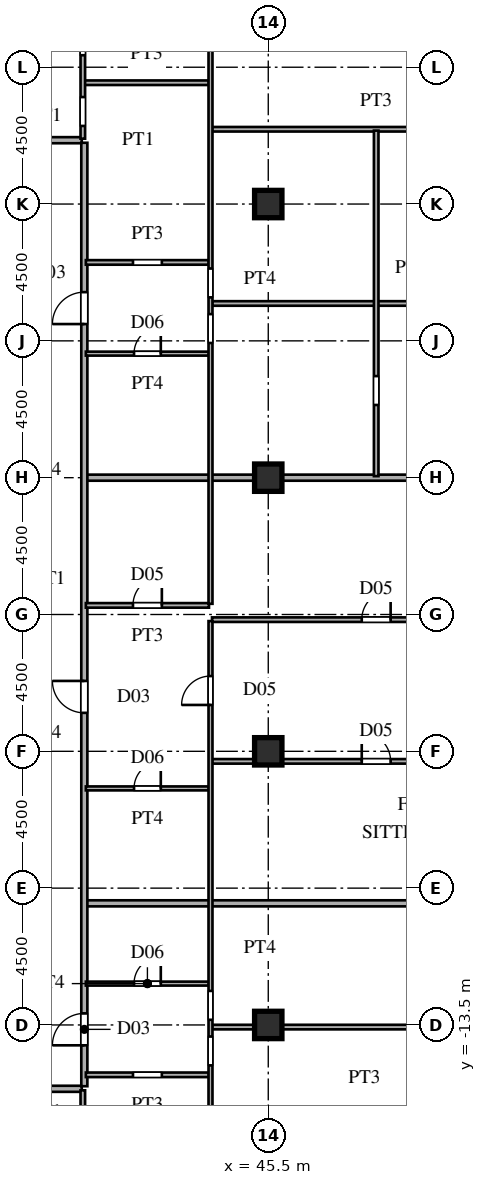
"""IFC4 building model, lengths in metres.
Left out: names, types, materials, properties, quantities, classifications, styles, units other than length and angle.
Written with IfcOpenShell. Run it as: python <this file> out.ifc"""

import sys

from ifc_helpers import new_model, si_unit, direction, frame, frame_2d, origin, origin_2d, place, context, subcontext, project, spatial, rectangle, i_section, extrude, source, transform, mapped, element, fill, save


model = new_model("IFC4")
c1 = context("Model", 3, precision=1e-05, world=origin(), true_north=direction((0.0, 1.0)))
c2 = subcontext(c1, "Body", "Model", "MODEL_VIEW")
j1 = project(units=[si_unit("LENGTHUNIT", "METRE"), si_unit("PLANEANGLEUNIT", "RADIAN")], contexts=[c1])
p1 = place(None, origin())
s1 = spatial("IfcSite", under=j1, at=p1, CompositionType="ELEMENT")
p2 = place(p1, origin())
s2 = spatial("IfcBuilding", under=s1, at=p2, CompositionType="ELEMENT")
p3 = place(p2, frame((0.0, 0.0, 18.9)))
s3 = spatial("IfcBuildingStorey", under=s2, at=p3, CompositionType="ELEMENT", Elevation=18.9)
m1 = source(origin(), c2, "Body", "SweptSolid", [
    extrude(i_section(OverallWidth=0.9, OverallDepth=0.9, WebThickness=0.036, FlangeThickness=0.055, at=origin_2d()), origin(), (0.0, 0.0, 1.0), 3.6),
])
for number, where, z_axis, x_axis in (
    (1, (45.5, -13.5, 0.0), (0.0, 0.0, 1.0), (1.0, 0.0, 0.0)),
    (2, (45.5, -4.5, 0.0), (0.0, 0.0, 1.0), (1.0, 0.0, 0.0)),
    (3, (45.5, 4.5, 0.0), (0.0, 0.0, 1.0), (1.0, 0.0, 0.0)),
    (4, (45.5, 13.5, 0.0), (0.0, 0.0, 1.0), (1.0, 0.0, 0.0)),
):
    element("IfcColumn", number, at=place(p3, frame(where, z_axis=z_axis, x_axis=x_axis)), inside=s3, PredefinedType="COLUMN", context=c2, shape_type="MappedRepresentation", body=[
        mapped(m1, transform((0.0, 0.0, 0.0), scale=1.0)),
    ])
p4 = place(p3, frame((36.585, -15.6, 0.0), z_axis=(0.0, 0.0, 1.0), x_axis=(1.0, 0.0, 0.0)))
e5 = element("IfcWall", 5, at=p4, inside=s3, PredefinedType="PARTITIONING", context=c2, shape_type="SweptSolid", body=[
    extrude(rectangle(XDim=2.78, YDim=0.2, at=frame_2d((1.39, 0.0))), origin(), (0.0, 0.0, 1.0), 3.38),
])
p5 = place(p3, frame((39.5, -15.14, 0.0), z_axis=(0.0, 0.0, 1.0), x_axis=(1.0, 0.0, 0.0)))
e6 = element("IfcWall", 6, at=p5, inside=s3, PredefinedType="PARTITIONING", context=c2, shape_type="SweptSolid", body=[
    extrude(rectangle(XDim=4.05, YDim=0.15, at=frame_2d((2.025, 0.0))), origin(), (0.0, 0.0, 1.0), 3.38),
])
p6 = place(p5, frame((1.55, 0.0, 0.0)))
e7 = element("IfcOpeningElement", 7, at=p6, cuts=e6, PredefinedType="OPENING", context=c2, shape_type="SweptSolid", body=[
    extrude(rectangle(XDim=0.95, YDim=2.15, at=frame_2d((0.475, 1.075))), frame((0.0, 0.085, 0.0), z_axis=(0.0, -1.0, 0.0), x_axis=(1.0, 0.0, 0.0)), (0.0, 0.0, 1.0), 0.17),
])
p7 = place(p3, frame((43.65, -13.57, 0.0), z_axis=(0.0, 0.0, 1.0), x_axis=(1.0, 0.0, 0.0)))
e8 = element("IfcWall", 8, at=p7, inside=s3, PredefinedType="PARTITIONING", context=c2, shape_type="SweptSolid", body=[
    extrude(rectangle(XDim=20.075, YDim=0.15, at=frame_2d((10.038, 0.0))), origin(), (0.0, 0.0, 1.0), 2.68),
])
p8 = place(p3, frame((39.5, -12.14, 0.0), z_axis=(0.0, 0.0, 1.0), x_axis=(1.0, 0.0, 0.0)))
e9 = element("IfcWall", 9, at=p8, inside=s3, PredefinedType="PARTITIONING", context=c2, shape_type="SweptSolid", body=[
    extrude(rectangle(XDim=4.05, YDim=0.13, at=frame_2d((2.025, 0.0))), origin(), (0.0, 0.0, 1.0), 3.38),
])
p9 = place(p8, frame((1.585, 0.0, 0.0)))
e10 = element("IfcOpeningElement", 10, at=p9, cuts=e9, PredefinedType="OPENING", context=c2, shape_type="SweptSolid", body=[
    extrude(rectangle(XDim=0.88, YDim=2.1, at=frame_2d((0.44, 1.05))), frame((0.0, 0.075, 0.0), z_axis=(0.0, -1.0, 0.0), x_axis=(1.0, 0.0, 0.0)), (0.0, 0.0, 1.0), 0.15),
])
p10 = place(p3, frame((39.53, -9.5, 0.0), z_axis=(0.0, 0.0, 1.0), x_axis=(1.0, 0.0, 0.0)))
e11 = element("IfcWall", 11, at=p10, inside=s3, PredefinedType="PARTITIONING", context=c2, shape_type="SweptSolid", body=[
    extrude(rectangle(XDim=32.845, YDim=0.2, at=frame_2d((16.422, 0.0))), origin(), (0.0, 0.0, 1.0), 3.38),
])
p11 = place(p3, frame((39.5, -5.72, 0.0), z_axis=(0.0, 0.0, 1.0), x_axis=(1.0, 0.0, 0.0)))
e12 = element("IfcWall", 12, at=p11, inside=s3, PredefinedType="PARTITIONING", context=c2, shape_type="SweptSolid", body=[
    extrude(rectangle(XDim=4.05, YDim=0.13, at=frame_2d((2.025, 0.0))), origin(), (0.0, 0.0, 1.0), 3.38),
])
p12 = place(p11, frame((1.585, 0.0, 0.0)))
e13 = element("IfcOpeningElement", 13, at=p12, cuts=e12, PredefinedType="OPENING", context=c2, shape_type="SweptSolid", body=[
    extrude(rectangle(XDim=0.88, YDim=2.1, at=frame_2d((0.44, 1.05))), frame((0.0, 0.075, 0.0), z_axis=(0.0, -1.0, 0.0), x_axis=(1.0, 0.0, 0.0)), (0.0, 0.0, 1.0), 0.15),
])
p13 = place(p3, frame((43.65, -4.83, 0.0), z_axis=(0.0, 0.0, 1.0), x_axis=(1.0, 0.0, 0.0)))
e14 = element("IfcWall", 14, at=p13, inside=s3, PredefinedType="PARTITIONING", context=c2, shape_type="SweptSolid", body=[
    extrude(rectangle(XDim=28.885, YDim=0.15, at=frame_2d((14.442, 0.0))), origin(), (0.0, 0.0, 1.0), 3.38),
])
p14 = place(p13, frame((4.925, 0.0, 0.0)))
e15 = element("IfcOpeningElement", 15, at=p14, cuts=e14, PredefinedType="OPENING", context=c2, shape_type="SweptSolid", body=[
    extrude(rectangle(XDim=0.95, YDim=2.15, at=frame_2d((0.475, 1.075))), frame((0.0, 0.085, 0.0), z_axis=(0.0, -1.0, 0.0), x_axis=(1.0, 0.0, 0.0)), (0.0, 0.0, 1.0), 0.17),
])
p15 = place(p13, frame((13.225, 0.0, 0.0)))
e16 = element("IfcOpeningElement", 16, at=p15, cuts=e14, PredefinedType="OPENING", context=c2, shape_type="SweptSolid", body=[
    extrude(rectangle(XDim=0.95, YDim=2.15, at=frame_2d((0.475, 1.075))), frame((0.0, 0.085, 0.0), z_axis=(0.0, -1.0, 0.0), x_axis=(1.0, 0.0, 0.0)), (0.0, 0.0, 1.0), 0.17),
])
p16 = place(p3, frame((43.65, -0.17, 0.0), z_axis=(0.0, 0.0, 1.0), x_axis=(1.0, 0.0, 0.0)))
e17 = element("IfcWall", 17, at=p16, inside=s3, PredefinedType="PARTITIONING", context=c2, shape_type="SweptSolid", body=[
    extrude(rectangle(XDim=28.885, YDim=0.15, at=frame_2d((14.442, 0.0))), origin(), (0.0, 0.0, 1.0), 3.38),
])
p17 = place(p16, frame((4.925, 0.0, 0.0)))
e18 = element("IfcOpeningElement", 18, at=p17, cuts=e17, PredefinedType="OPENING", context=c2, shape_type="SweptSolid", body=[
    extrude(rectangle(XDim=0.95, YDim=2.15, at=frame_2d((0.475, 1.075))), frame((0.0, 0.085, 0.0), z_axis=(0.0, -1.0, 0.0), x_axis=(1.0, 0.0, 0.0)), (0.0, 0.0, 1.0), 0.17),
])
p18 = place(p16, frame((13.225, 0.0, 0.0)))
e19 = element("IfcOpeningElement", 19, at=p18, cuts=e17, PredefinedType="OPENING", context=c2, shape_type="SweptSolid", body=[
    extrude(rectangle(XDim=0.95, YDim=2.15, at=frame_2d((0.475, 1.075))), frame((0.0, 0.085, 0.0), z_axis=(0.0, -1.0, 0.0), x_axis=(1.0, 0.0, 0.0)), (0.0, 0.0, 1.0), 0.17),
])
p19 = place(p3, frame((39.5, 0.3, 0.0), z_axis=(0.0, 0.0, 1.0), x_axis=(1.0, 0.0, 0.0)))
e20 = element("IfcWall", 20, at=p19, inside=s3, PredefinedType="PARTITIONING", context=c2, shape_type="SweptSolid", body=[
    extrude(rectangle(XDim=4.05, YDim=0.15, at=frame_2d((2.025, 0.0))), origin(), (0.0, 0.0, 1.0), 3.38),
])
p20 = place(p19, frame((1.55, 0.0, 0.0)))
e21 = element("IfcOpeningElement", 21, at=p20, cuts=e20, PredefinedType="OPENING", context=c2, shape_type="SweptSolid", body=[
    extrude(rectangle(XDim=0.95, YDim=2.15, at=frame_2d((0.475, 1.075))), frame((0.0, 0.085, 0.0), z_axis=(0.0, -1.0, 0.0), x_axis=(1.0, 0.0, 0.0)), (0.0, 0.0, 1.0), 0.17),
])
p21 = place(p3, frame((39.53, 4.5, 0.0), z_axis=(0.0, 0.0, 1.0), x_axis=(1.0, 0.0, 0.0)))
e22 = element("IfcWall", 22, at=p21, inside=s3, PredefinedType="PARTITIONING", context=c2, shape_type="SweptSolid", body=[
    extrude(rectangle(XDim=14.99, YDim=0.2, at=frame_2d((7.495, 0.0))), origin(), (0.0, 0.0, 1.0), 2.68),
])
p22 = place(p3, frame((39.5, 8.58, 0.0), z_axis=(0.0, 0.0, 1.0), x_axis=(1.0, 0.0, 0.0)))
e23 = element("IfcWall", 23, at=p22, inside=s3, PredefinedType="PARTITIONING", context=c2, shape_type="SweptSolid", body=[
    extrude(rectangle(XDim=4.05, YDim=0.13, at=frame_2d((2.025, 0.0))), origin(), (0.0, 0.0, 1.0), 3.38),
])
p23 = place(p22, frame((1.585, 0.0, 0.0)))
e24 = element("IfcOpeningElement", 24, at=p23, cuts=e23, PredefinedType="OPENING", context=c2, shape_type="SweptSolid", body=[
    extrude(rectangle(XDim=0.88, YDim=2.1, at=frame_2d((0.44, 1.05))), frame((0.0, 0.075, 0.0), z_axis=(0.0, -1.0, 0.0), x_axis=(1.0, 0.0, 0.0)), (0.0, 0.0, 1.0), 0.15),
])
p24 = place(p3, frame((43.65, 10.23, 0.0), z_axis=(0.0, 0.0, 1.0), x_axis=(1.0, 0.0, 0.0)))
e25 = element("IfcWall", 25, at=p24, inside=s3, PredefinedType="PARTITIONING", context=c2, shape_type="SweptSolid", body=[
    extrude(rectangle(XDim=27.949, YDim=0.15, at=frame_2d((13.974, 0.0))), origin(), (0.0, 0.0, 1.0), 3.38),
])
p25 = place(p24, frame((21.938, 0.0, 0.0)))
e26 = element("IfcOpeningElement", 26, at=p25, cuts=e25, PredefinedType="OPENING", context=c2, shape_type="SweptSolid", body=[
    extrude(rectangle(XDim=0.95, YDim=2.15, at=frame_2d((0.475, 1.075))), frame((0.0, 0.085, 0.0), z_axis=(0.0, -1.0, 0.0), x_axis=(1.0, 0.0, 0.0)), (0.0, 0.0, 1.0), 0.17),
])
p26 = place(p24, frame((13.225, 0.0, 0.0)))
e27 = element("IfcOpeningElement", 27, at=p26, cuts=e25, PredefinedType="OPENING", context=c2, shape_type="SweptSolid", body=[
    extrude(rectangle(XDim=0.95, YDim=2.15, at=frame_2d((0.475, 1.075))), frame((0.0, 0.085, 0.0), z_axis=(0.0, -1.0, 0.0), x_axis=(1.0, 0.0, 0.0)), (0.0, 0.0, 1.0), 0.17),
])
p27 = place(p24, frame((7.65, 0.0, 0.0)))
e28 = element("IfcOpeningElement", 28, at=p27, cuts=e25, PredefinedType="OPENING", context=c2, shape_type="SweptSolid", body=[
    extrude(rectangle(XDim=0.95, YDim=2.15, at=frame_2d((0.475, 1.075))), frame((0.0, 0.085, 0.0), z_axis=(0.0, -1.0, 0.0), x_axis=(1.0, 0.0, 0.0)), (0.0, 0.0, 1.0), 0.17),
])
p28 = place(p3, frame((39.5, 11.58, 0.0), z_axis=(0.0, 0.0, 1.0), x_axis=(1.0, 0.0, 0.0)))
e29 = element("IfcWall", 29, at=p28, inside=s3, PredefinedType="PARTITIONING", context=c2, shape_type="SweptSolid", body=[
    extrude(rectangle(XDim=4.05, YDim=0.15, at=frame_2d((2.025, 0.0))), origin(), (0.0, 0.0, 1.0), 3.38),
])
p29 = place(p28, frame((1.55, 0.0, 0.0)))
e30 = element("IfcOpeningElement", 30, at=p29, cuts=e29, PredefinedType="OPENING", context=c2, shape_type="SweptSolid", body=[
    extrude(rectangle(XDim=0.95, YDim=2.15, at=frame_2d((0.475, 1.075))), frame((0.0, 0.085, 0.0), z_axis=(0.0, -1.0, 0.0), x_axis=(1.0, 0.0, 0.0)), (0.0, 0.0, 1.0), 0.17),
])
p30 = place(p3, frame((36.585, 15.6, 0.0), z_axis=(0.0, 0.0, 1.0), x_axis=(1.0, 0.0, 0.0)))
e31 = element("IfcWall", 31, at=p30, inside=s3, PredefinedType="PARTITIONING", context=c2, shape_type="SweptSolid", body=[
    extrude(rectangle(XDim=2.78, YDim=0.2, at=frame_2d((1.39, 0.0))), origin(), (0.0, 0.0, 1.0), 3.38),
])
p31 = place(p3, frame((43.65, 15.96, 0.0), z_axis=(0.0, 0.0, 1.0), x_axis=(1.0, 0.0, 0.0)))
e32 = element("IfcWall", 32, at=p31, inside=s3, PredefinedType="PARTITIONING", context=c2, shape_type="SweptSolid", body=[
    extrude(rectangle(XDim=10.8, YDim=0.15, at=frame_2d((5.4, 0.0))), origin(), (0.0, 0.0, 1.0), 3.38),
])
p32 = place(p31, frame((7.65, 0.0, 0.0)))
e33 = element("IfcOpeningElement", 33, at=p32, cuts=e32, PredefinedType="OPENING", context=c2, shape_type="SweptSolid", body=[
    extrude(rectangle(XDim=0.95, YDim=2.15, at=frame_2d((0.475, 1.075))), frame((0.0, 0.085, 0.0), z_axis=(0.0, -1.0, 0.0), x_axis=(1.0, 0.0, 0.0)), (0.0, 0.0, 1.0), 0.17),
])
p33 = place(p3, frame((39.45, 17.49, 0.0), z_axis=(0.0, 0.0, 1.0), x_axis=(1.0, 0.0, 0.0)))
e34 = element("IfcWall", 34, at=p33, inside=s3, PredefinedType="PARTITIONING", context=c2, shape_type="SweptSolid", body=[
    extrude(rectangle(XDim=4.1, YDim=0.15, at=frame_2d((2.05, 0.0))), origin(), (0.0, 0.0, 1.0), 3.38),
])
p34 = place(p3, frame((39.4, -23.433, 0.0), z_axis=(0.0, 0.0, 1.0), x_axis=(0.0, 1.0, 0.0)))
e35 = element("IfcWall", 35, at=p34, inside=s3, PredefinedType="PARTITIONING", context=c2, shape_type="SweptSolid", body=[
    extrude(rectangle(XDim=7.783, YDim=0.15, at=frame_2d((3.892, 0.0))), origin(), (0.0, 0.0, 1.0), 3.38),
])
p35 = place(p34, frame((1.134, 0.0, 0.0)))
e36 = element("IfcOpeningElement", 36, at=p35, cuts=e35, PredefinedType="OPENING", context=c2, shape_type="SweptSolid", body=[
    extrude(rectangle(XDim=0.95, YDim=2.15, at=frame_2d((0.475, 1.075))), frame((0.0, 0.085, 0.0), z_axis=(0.0, -1.0, 0.0), x_axis=(1.0, 0.0, 0.0)), (0.0, 0.0, 1.0), 0.17),
])
p36 = place(p3, frame((39.4, 15.65, 0.0), z_axis=(0.0, 0.0, 1.0), x_axis=(0.0, 1.0, 0.0)))
e37 = element("IfcWall", 37, at=p36, inside=s3, PredefinedType="PARTITIONING", context=c2, shape_type="SweptSolid", body=[
    extrude(rectangle(XDim=7.783, YDim=0.15, at=frame_2d((3.892, 0.0))), origin(), (0.0, 0.0, 1.0), 3.38),
])
p37 = place(p36, frame((0.419, 0.0, 0.0)))
e38 = element("IfcOpeningElement", 38, at=p37, cuts=e37, PredefinedType="OPENING", context=c2, shape_type="SweptSolid", body=[
    extrude(rectangle(XDim=0.95, YDim=2.15, at=frame_2d((0.475, 1.075))), frame((0.0, 0.085, 0.0), z_axis=(0.0, -1.0, 0.0), x_axis=(1.0, 0.0, 0.0)), (0.0, 0.0, 1.0), 0.17),
])
p38 = place(p36, frame((2.744, 0.0, 0.0)))
e39 = element("IfcOpeningElement", 39, at=p38, cuts=e37, PredefinedType="OPENING", context=c2, shape_type="SweptSolid", body=[
    extrude(rectangle(XDim=0.95, YDim=2.15, at=frame_2d((0.475, 1.075))), frame((0.0, 0.085, 0.0), z_axis=(0.0, -1.0, 0.0), x_axis=(1.0, 0.0, 0.0)), (0.0, 0.0, 1.0), 0.17),
])
p39 = place(p3, frame((39.45, -15.515, 0.0), z_axis=(0.0, 0.0, 1.0), x_axis=(0.0, 1.0, 0.0)))
e40 = element("IfcWall", 40, at=p39, inside=s3, PredefinedType="PARTITIONING", context=c2, shape_type="SweptSolid", body=[
    extrude(rectangle(XDim=31.03, YDim=0.2, at=frame_2d((15.515, 0.0))), origin(), (0.0, 0.0, 1.0), 3.38),
])
p40 = place(p39, frame((1.345, 0.0, 0.0)))
e41 = element("IfcOpeningElement", 41, at=p40, cuts=e40, PredefinedType="OPENING", context=c2, shape_type="SweptSolid", body=[
    extrude(rectangle(XDim=1.05, YDim=2.25, at=frame_2d((0.525, 1.125))), frame((0.0, 0.11, 0.0), z_axis=(0.0, -1.0, 0.0), x_axis=(1.0, 0.0, 0.0)), (0.0, 0.0, 1.0), 0.22),
])
p41 = place(p39, frame((12.28, 0.0, 0.0)))
e42 = element("IfcOpeningElement", 42, at=p41, cuts=e40, PredefinedType="OPENING", context=c2, shape_type="SweptSolid", body=[
    extrude(rectangle(XDim=1.05, YDim=2.25, at=frame_2d((0.525, 1.125))), frame((0.0, 0.11, 0.0), z_axis=(0.0, -1.0, 0.0), x_axis=(1.0, 0.0, 0.0)), (0.0, 0.0, 1.0), 0.22),
])
p42 = place(p39, frame((25.067, 0.0, 0.0)))
e43 = element("IfcOpeningElement", 43, at=p42, cuts=e40, PredefinedType="OPENING", context=c2, shape_type="SweptSolid", body=[
    extrude(rectangle(XDim=1.05, YDim=2.25, at=frame_2d((0.525, 1.125))), frame((0.0, 0.11, 0.0), z_axis=(0.0, -1.0, 0.0), x_axis=(1.0, 0.0, 0.0)), (0.0, 0.0, 1.0), 0.22),
])
p43 = place(p3, frame((43.6, -21.733, 0.0), z_axis=(0.0, 0.0, 1.0), x_axis=(0.0, 1.0, 0.0)))
e44 = element("IfcWall", 44, at=p43, inside=s3, PredefinedType="PARTITIONING", context=c2, shape_type="SweptSolid", body=[
    extrude(rectangle(XDim=21.516, YDim=0.13, at=frame_2d((10.758, 0.0))), origin(), (0.0, 0.0, 1.0), 3.38),
])
p44 = place(p43, frame((6.903, 0.0, 0.0)))
e45 = element("IfcOpeningElement", 45, at=p44, cuts=e44, PredefinedType="OPENING", context=c2, shape_type="SweptSolid", body=[
    extrude(rectangle(XDim=0.95, YDim=2.15, at=frame_2d((0.475, 1.075))), frame((0.0, 0.075, 0.0), z_axis=(0.0, -1.0, 0.0), x_axis=(1.0, 0.0, 0.0)), (0.0, 0.0, 1.0), 0.15),
])
p45 = place(p43, frame((8.403, 0.0, 0.0)))
e46 = element("IfcOpeningElement", 46, at=p45, cuts=e44, PredefinedType="OPENING", context=c2, shape_type="SweptSolid", body=[
    extrude(rectangle(XDim=0.95, YDim=2.15, at=frame_2d((0.475, 1.075))), frame((0.0, 0.075, 0.0), z_axis=(0.0, -1.0, 0.0), x_axis=(1.0, 0.0, 0.0)), (0.0, 0.0, 1.0), 0.15),
])
p46 = place(p43, frame((18.758, 0.0, 0.0)))
e47 = element("IfcOpeningElement", 47, at=p46, cuts=e44, PredefinedType="OPENING", context=c2, shape_type="SweptSolid", body=[
    extrude(rectangle(XDim=0.95, YDim=2.15, at=frame_2d((0.475, 1.075))), frame((0.0, 0.075, 0.0), z_axis=(0.0, -1.0, 0.0), x_axis=(1.0, 0.0, 0.0)), (0.0, 0.0, 1.0), 0.15),
])
p47 = place(p3, frame((43.6, 0.352, 0.0), z_axis=(0.0, 0.0, 1.0), x_axis=(0.0, 1.0, 0.0)))
e48 = element("IfcWall", 48, at=p47, inside=s3, PredefinedType="PARTITIONING", context=c2, shape_type="SweptSolid", body=[
    extrude(rectangle(XDim=21.381, YDim=0.13, at=frame_2d((10.69, 0.0))), origin(), (0.0, 0.0, 1.0), 3.38),
])
p48 = place(p47, frame((8.578, 0.0, 0.0)))
e49 = element("IfcOpeningElement", 49, at=p48, cuts=e48, PredefinedType="OPENING", context=c2, shape_type="SweptSolid", body=[
    extrude(rectangle(XDim=0.95, YDim=2.15, at=frame_2d((0.475, 1.075))), frame((0.0, 0.075, 0.0), z_axis=(0.0, -1.0, 0.0), x_axis=(1.0, 0.0, 0.0)), (0.0, 0.0, 1.0), 0.15),
])
p49 = place(p47, frame((10.078, 0.0, 0.0)))
e50 = element("IfcOpeningElement", 50, at=p49, cuts=e48, PredefinedType="OPENING", context=c2, shape_type="SweptSolid", body=[
    extrude(rectangle(XDim=0.95, YDim=2.15, at=frame_2d((0.475, 1.075))), frame((0.0, 0.075, 0.0), z_axis=(0.0, -1.0, 0.0), x_axis=(1.0, 0.0, 0.0)), (0.0, 0.0, 1.0), 0.15),
])
p50 = place(p3, frame((49.05, 4.55, 0.0), z_axis=(0.0, 0.0, 1.0), x_axis=(0.0, 1.0, 0.0)))
e51 = element("IfcWall", 51, at=p50, inside=s3, PredefinedType="PARTITIONING", context=c2, shape_type="SweptSolid", body=[
    extrude(rectangle(XDim=11.365, YDim=0.15, at=frame_2d((5.683, 0.0))), origin(), (0.0, 0.0, 1.0), 3.38),
])
p51 = place(p50, frame((2.341, 0.0, 0.0)))
e52 = element("IfcOpeningElement", 52, at=p51, cuts=e51, PredefinedType="OPENING", context=c2, shape_type="SweptSolid", body=[
    extrude(rectangle(XDim=0.95, YDim=2.15, at=frame_2d((0.475, 1.075))), frame((0.0, 0.085, 0.0), z_axis=(0.0, -1.0, 0.0), x_axis=(1.0, 0.0, 0.0)), (0.0, 0.0, 1.0), 0.17),
])
m2 = source(origin(), c2, "Body", "SweptSolid", [
    extrude(rectangle(XDim=0.88, YDim=2.1, at=frame_2d((0.44, 1.05))), frame((0.0, 0.025, 0.0), z_axis=(0.0, -1.0, 0.0), x_axis=(1.0, 0.0, 0.0)), (0.0, 0.0, 1.0), 0.05),
])
p52 = place(p9, origin())
e53 = element("IfcDoor", 53, at=p52, inside=s3, OperationType="SINGLE_SWING_RIGHT", PredefinedType="DOOR", context=c2, shape_type="MappedRepresentation", body=[
    mapped(m2, transform((0.0, 0.0, 0.0), scale=1.0)),
])
fill(e10, e53)
p53 = place(p12, origin())
e54 = element("IfcDoor", 54, at=p53, inside=s3, OperationType="SINGLE_SWING_RIGHT", PredefinedType="DOOR", context=c2, shape_type="MappedRepresentation", body=[
    mapped(m2, transform((0.0, 0.0, 0.0), scale=1.0)),
])
fill(e13, e54)
m3 = source(origin(), c2, "Body", "SweptSolid", [
    extrude(rectangle(XDim=0.95, YDim=2.15, at=frame_2d((0.475, 1.075))), frame((0.0, 0.025, 0.0), z_axis=(0.0, -1.0, 0.0), x_axis=(1.0, 0.0, 0.0)), (0.0, 0.0, 1.0), 0.05),
])
p54 = place(p14, origin())
e55 = element("IfcDoor", 55, at=p54, inside=s3, OperationType="SINGLE_SWING_LEFT", PredefinedType="DOOR", context=c2, shape_type="MappedRepresentation", body=[
    mapped(m3, transform((0.0, 0.0, 0.0), scale=1.0)),
])
fill(e15, e55)
p55 = place(p17, origin())
e56 = element("IfcDoor", 56, at=p55, inside=s3, OperationType="SINGLE_SWING_RIGHT", PredefinedType="DOOR", context=c2, shape_type="MappedRepresentation", body=[
    mapped(m3, transform((0.0, 0.0, 0.0), scale=1.0)),
])
fill(e18, e56)
p56 = place(p20, origin())
e57 = element("IfcDoor", 57, at=p56, inside=s3, OperationType="SINGLE_SWING_RIGHT", PredefinedType="DOOR", context=c2, shape_type="MappedRepresentation", body=[
    mapped(m3, transform((0.0, 0.0, 0.0), scale=1.0)),
])
fill(e21, e57)
p57 = place(p23, origin())
e58 = element("IfcDoor", 58, at=p57, inside=s3, OperationType="SINGLE_SWING_RIGHT", PredefinedType="DOOR", context=c2, shape_type="MappedRepresentation", body=[
    mapped(m2, transform((0.0, 0.0, 0.0), scale=1.0)),
])
fill(e24, e58)
m4 = source(origin(), c2, "Body", "SweptSolid", [
    extrude(rectangle(XDim=1.05, YDim=2.25, at=frame_2d((0.525, 1.125))), frame((0.0, 0.025, 0.0), z_axis=(0.0, -1.0, 0.0), x_axis=(1.0, 0.0, 0.0)), (0.0, 0.0, 1.0), 0.05),
])
p58 = place(p40, origin())
e59 = element("IfcDoor", 59, at=p58, inside=s3, OperationType="SINGLE_SWING_LEFT", PredefinedType="DOOR", context=c2, shape_type="MappedRepresentation", body=[
    mapped(m4, transform((0.0, 0.0, 0.0), scale=1.0)),
])
fill(e41, e59)
p59 = place(p41, origin())
e60 = element("IfcDoor", 60, at=p59, inside=s3, OperationType="SINGLE_SWING_RIGHT", PredefinedType="DOOR", context=c2, shape_type="MappedRepresentation", body=[
    mapped(m4, transform((0.0, 0.0, 0.0), scale=1.0)),
])
fill(e42, e60)
p60 = place(p42, origin())
e61 = element("IfcDoor", 61, at=p60, inside=s3, OperationType="SINGLE_SWING_LEFT", PredefinedType="DOOR", context=c2, shape_type="MappedRepresentation", body=[
    mapped(m4, transform((0.0, 0.0, 0.0), scale=1.0)),
])
fill(e43, e61)
p61 = place(p46, origin())
e62 = element("IfcDoor", 62, at=p61, inside=s3, OperationType="SINGLE_SWING_LEFT", PredefinedType="DOOR", context=c2, shape_type="MappedRepresentation", body=[
    mapped(m3, transform((0.0, 0.0, 0.0), scale=1.0)),
])
fill(e47, e62)
save(model, sys.argv[1])
